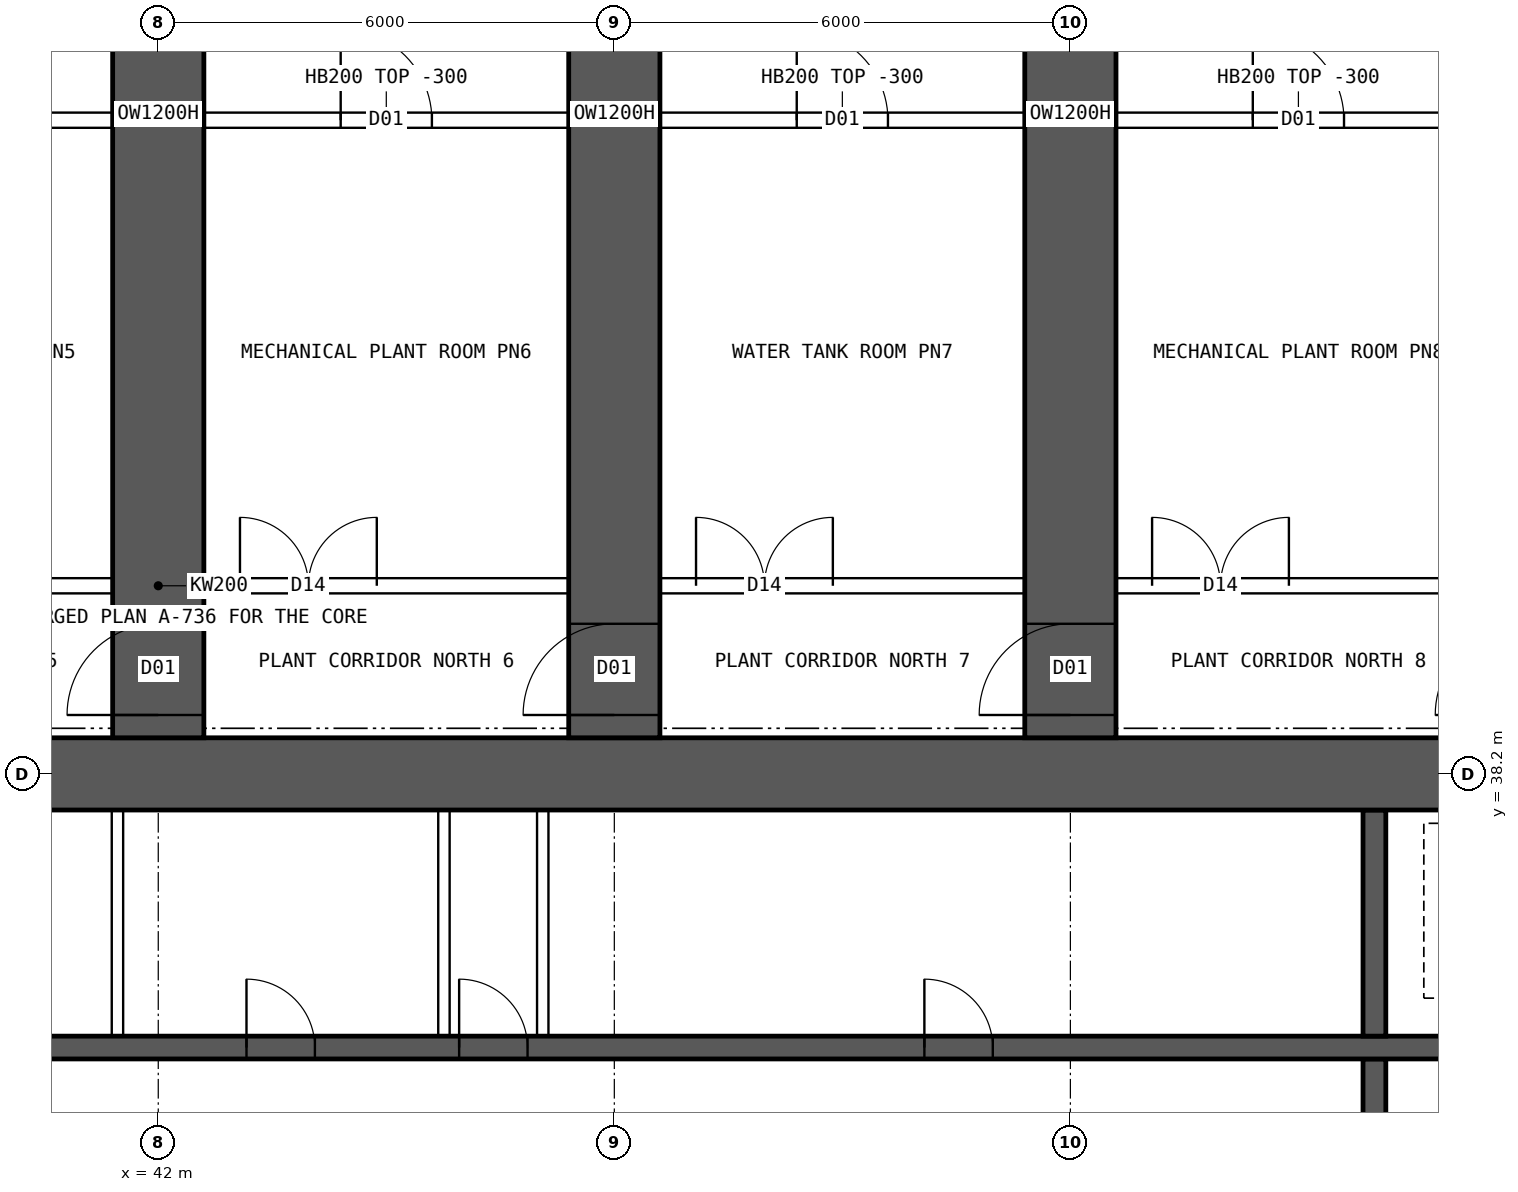
"""IFC4 building model, lengths in metres.
Left out: names, types, materials, properties, quantities, classifications, styles, units other than length and angle.
Written with IfcOpenShell. Run it as: python <this file> out.ifc"""

import sys

from ifc_helpers import new_model, si_unit, direction, frame, frame_2d, origin, place, context, subcontext, project, spatial, rectangle, extrude, element, fill, save


model = new_model("IFC4")
c1 = context("Model", 3, precision=1e-05, world=origin(), true_north=direction((0.0, 1.0)))
c2 = subcontext(c1, "Body", "Model", "MODEL_VIEW")
j1 = project(units=[si_unit("LENGTHUNIT", "METRE"), si_unit("PLANEANGLEUNIT", "RADIAN")], contexts=[c1])
p1 = place(None, origin())
s1 = spatial("IfcSite", under=j1, at=p1, CompositionType="ELEMENT")
p2 = place(p1, origin())
s2 = spatial("IfcBuilding", under=s1, at=p2, CompositionType="ELEMENT")
p3 = place(p2, frame((0.0, 0.0, 133.15)))
s3 = spatial("IfcBuildingStorey", under=s2, at=p3, CompositionType="ELEMENT", Elevation=133.15)
p4 = place(p3, frame((18.0, 38.2, 0.0), z_axis=(0.0, 0.0, 1.0), x_axis=(1.0, 0.0, 0.0)))
e1 = element("IfcWall", 1, at=p4, inside=s3, PredefinedType="SHEAR", context=c2, shape_type="SweptSolid", body=[
    extrude(rectangle(XDim=48.0, YDim=0.95, at=frame_2d((24.0, 0.0))), origin(), (0.0, 0.0, 1.0), 7.2),
])
p5 = place(p3, frame((18.475, 34.6, 0.0), z_axis=(0.0, 0.0, 1.0), x_axis=(1.0, 0.0, 0.0)))
e2 = element("IfcWall", 2, at=p5, inside=s3, PredefinedType="SHEAR", context=c2, shape_type="SweptSolid", body=[
    extrude(rectangle(XDim=47.05, YDim=0.3, at=frame_2d((23.525, 0.0))), origin(), (0.0, 0.0, 1.0), 7.2),
])
p6 = place(p5, frame((0.9, 0.0, 0.0)))
e3 = element("IfcOpeningElement", 3, at=p6, cuts=e2, PredefinedType="OPENING", context=c2, shape_type="SweptSolid", body=[
    extrude(rectangle(XDim=1.1, YDim=2.1, at=frame_2d((0.55, 1.05))), frame((0.0, 0.16, 0.0), z_axis=(0.0, -1.0, 0.0), x_axis=(1.0, 0.0, 0.0)), (0.0, 0.0, 1.0), 0.32),
])
p7 = place(p5, frame((45.05, 0.0, 0.0)))
e4 = element("IfcOpeningElement", 4, at=p7, cuts=e2, PredefinedType="OPENING", context=c2, shape_type="SweptSolid", body=[
    extrude(rectangle(XDim=1.1, YDim=2.1, at=frame_2d((0.55, 1.05))), frame((0.0, 0.16, 0.0), z_axis=(0.0, -1.0, 0.0), x_axis=(1.0, 0.0, 0.0)), (0.0, 0.0, 1.0), 0.32),
])
p8 = place(p5, frame((4.125, 0.0, 0.0)))
e5 = element("IfcOpeningElement", 5, at=p8, cuts=e2, PredefinedType="OPENING", context=c2, shape_type="SweptSolid", body=[
    extrude(rectangle(XDim=0.9, YDim=2.1, at=frame_2d((0.45, 1.05))), frame((0.0, 0.16, 0.0), z_axis=(0.0, -1.0, 0.0), x_axis=(1.0, 0.0, 0.0)), (0.0, 0.0, 1.0), 0.32),
])
p9 = place(p5, frame((42.025, 0.0, 0.0)))
e6 = element("IfcOpeningElement", 6, at=p9, cuts=e2, PredefinedType="OPENING", context=c2, shape_type="SweptSolid", body=[
    extrude(rectangle(XDim=0.9, YDim=2.1, at=frame_2d((0.45, 1.05))), frame((0.0, 0.16, 0.0), z_axis=(0.0, -1.0, 0.0), x_axis=(1.0, 0.0, 0.0)), (0.0, 0.0, 1.0), 0.32),
])
p10 = place(p5, frame((8.9, 0.0, 0.0)))
e7 = element("IfcOpeningElement", 7, at=p10, cuts=e2, PredefinedType="OPENING", context=c2, shape_type="SweptSolid", body=[
    extrude(rectangle(XDim=0.9, YDim=2.1, at=frame_2d((0.45, 1.05))), frame((0.0, 0.16, 0.0), z_axis=(0.0, -1.0, 0.0), x_axis=(1.0, 0.0, 0.0)), (0.0, 0.0, 1.0), 0.32),
])
p11 = place(p5, frame((12.874, 0.0, 0.0)))
e8 = element("IfcOpeningElement", 8, at=p11, cuts=e2, PredefinedType="OPENING", context=c2, shape_type="SweptSolid", body=[
    extrude(rectangle(XDim=0.9, YDim=2.1, at=frame_2d((0.45, 1.05))), frame((0.0, 0.16, 0.0), z_axis=(0.0, -1.0, 0.0), x_axis=(1.0, 0.0, 0.0)), (0.0, 0.0, 1.0), 0.32),
])
p12 = place(p5, frame((16.521, 0.0, 0.0)))
e9 = element("IfcOpeningElement", 9, at=p12, cuts=e2, PredefinedType="OPENING", context=c2, shape_type="SweptSolid", body=[
    extrude(rectangle(XDim=0.9, YDim=2.1, at=frame_2d((0.45, 1.05))), frame((0.0, 0.16, 0.0), z_axis=(0.0, -1.0, 0.0), x_axis=(1.0, 0.0, 0.0)), (0.0, 0.0, 1.0), 0.32),
])
p13 = place(p5, frame((20.28, 0.0, 0.0)))
e10 = element("IfcOpeningElement", 10, at=p13, cuts=e2, PredefinedType="OPENING", context=c2, shape_type="SweptSolid", body=[
    extrude(rectangle(XDim=0.9, YDim=2.1, at=frame_2d((0.45, 1.05))), frame((0.0, 0.16, 0.0), z_axis=(0.0, -1.0, 0.0), x_axis=(1.0, 0.0, 0.0)), (0.0, 0.0, 1.0), 0.32),
])
p14 = place(p5, frame((24.686, 0.0, 0.0)))
e11 = element("IfcOpeningElement", 11, at=p14, cuts=e2, PredefinedType="OPENING", context=c2, shape_type="SweptSolid", body=[
    extrude(rectangle(XDim=0.9, YDim=2.1, at=frame_2d((0.45, 1.05))), frame((0.0, 0.16, 0.0), z_axis=(0.0, -1.0, 0.0), x_axis=(1.0, 0.0, 0.0)), (0.0, 0.0, 1.0), 0.32),
])
p15 = place(p5, frame((27.483, 0.0, 0.0)))
e12 = element("IfcOpeningElement", 12, at=p15, cuts=e2, PredefinedType="OPENING", context=c2, shape_type="SweptSolid", body=[
    extrude(rectangle(XDim=0.9, YDim=2.1, at=frame_2d((0.45, 1.05))), frame((0.0, 0.16, 0.0), z_axis=(0.0, -1.0, 0.0), x_axis=(1.0, 0.0, 0.0)), (0.0, 0.0, 1.0), 0.32),
])
p16 = place(p5, frame((33.604, 0.0, 0.0)))
e13 = element("IfcOpeningElement", 13, at=p16, cuts=e2, PredefinedType="OPENING", context=c2, shape_type="SweptSolid", body=[
    extrude(rectangle(XDim=0.9, YDim=2.1, at=frame_2d((0.45, 1.05))), frame((0.0, 0.16, 0.0), z_axis=(0.0, -1.0, 0.0), x_axis=(1.0, 0.0, 0.0)), (0.0, 0.0, 1.0), 0.32),
])
p17 = place(p3, frame((58.0, 30.55, 0.0), z_axis=(0.0, 0.0, 1.0), x_axis=(0.0, 1.0, 0.0)))
e14 = element("IfcWall", 14, at=p17, inside=s3, PredefinedType="SHEAR", context=c2, shape_type="SweptSolid", body=[
    extrude(rectangle(XDim=3.9, YDim=0.3, at=frame_2d((1.95, 0.0))), origin(), (0.0, 0.0, 1.0), 7.2),
])
p18 = place(p17, frame((1.4, 0.0, 0.0)))
e15 = element("IfcOpeningElement", 15, at=p18, cuts=e14, PredefinedType="OPENING", context=c2, shape_type="SweptSolid", body=[
    extrude(rectangle(XDim=1.2, YDim=2.1, at=frame_2d((0.6, 1.05))), frame((0.0, 0.16, 0.0), z_axis=(0.0, -1.0, 0.0), x_axis=(1.0, 0.0, 0.0)), (0.0, 0.0, 1.0), 0.32),
])
p19 = place(p3, frame((58.0, 34.75, 0.0), z_axis=(0.0, 0.0, 1.0), x_axis=(0.0, 1.0, 0.0)))
e16 = element("IfcWall", 16, at=p19, inside=s3, PredefinedType="SHEAR", context=c2, shape_type="SweptSolid", body=[
    extrude(rectangle(XDim=2.975, YDim=0.3, at=frame_2d((1.488, 0.0))), origin(), (0.0, 0.0, 1.0), 7.2),
])
p20 = place(p3, frame((42.0, 38.675, 0.0), z_axis=(0.0, 0.0, 1.0), x_axis=(0.0, 1.0, 0.0)))
e17 = element("IfcWall", 17, at=p20, inside=s3, PredefinedType="SHEAR", context=c2, shape_type="SweptSolid", body=[
    extrude(rectangle(XDim=16.425, YDim=1.2, at=frame_2d((8.212, 0.0))), origin(), (0.0, 0.0, 1.0), 7.2),
])
p21 = place(p20, frame((0.3, 0.0, 0.0)))
e18 = element("IfcOpeningElement", 18, at=p21, cuts=e17, PredefinedType="OPENING", context=c2, shape_type="SweptSolid", body=[
    extrude(rectangle(XDim=1.2, YDim=2.1, at=frame_2d((0.6, 1.05))), frame((0.0, 0.61, 0.0), z_axis=(0.0, -1.0, 0.0), x_axis=(1.0, 0.0, 0.0)), (0.0, 0.0, 1.0), 1.22),
])
p22 = place(p3, frame((48.0, 38.675, 0.0), z_axis=(0.0, 0.0, 1.0), x_axis=(0.0, 1.0, 0.0)))
e19 = element("IfcWall", 19, at=p22, inside=s3, PredefinedType="SHEAR", context=c2, shape_type="SweptSolid", body=[
    extrude(rectangle(XDim=16.425, YDim=1.2, at=frame_2d((8.212, 0.0))), origin(), (0.0, 0.0, 1.0), 7.2),
])
p23 = place(p22, frame((0.3, 0.0, 0.0)))
e20 = element("IfcOpeningElement", 20, at=p23, cuts=e19, PredefinedType="OPENING", context=c2, shape_type="SweptSolid", body=[
    extrude(rectangle(XDim=1.2, YDim=2.1, at=frame_2d((0.6, 1.05))), frame((0.0, 0.61, 0.0), z_axis=(0.0, -1.0, 0.0), x_axis=(1.0, 0.0, 0.0)), (0.0, 0.0, 1.0), 1.22),
])
p24 = place(p3, frame((54.0, 38.675, 0.0), z_axis=(0.0, 0.0, 1.0), x_axis=(0.0, 1.0, 0.0)))
e21 = element("IfcWall", 21, at=p24, inside=s3, PredefinedType="SHEAR", context=c2, shape_type="SweptSolid", body=[
    extrude(rectangle(XDim=16.425, YDim=1.2, at=frame_2d((8.212, 0.0))), origin(), (0.0, 0.0, 1.0), 7.2),
])
p25 = place(p24, frame((0.3, 0.0, 0.0)))
e22 = element("IfcOpeningElement", 22, at=p25, cuts=e21, PredefinedType="OPENING", context=c2, shape_type="SweptSolid", body=[
    extrude(rectangle(XDim=1.2, YDim=2.1, at=frame_2d((0.6, 1.05))), frame((0.0, 0.61, 0.0), z_axis=(0.0, -1.0, 0.0), x_axis=(1.0, 0.0, 0.0)), (0.0, 0.0, 1.0), 1.22),
])
for number, where, z_axis, x_axis in (
    (23, (41.463, 34.75, 0.0), (0.0, 0.0, 1.0), (0.0, 1.0, 0.0)),
    (24, (45.758, 34.75, 0.0), (0.0, 0.0, 1.0), (0.0, 1.0, 0.0)),
    (25, (47.058, 34.75, 0.0), (0.0, 0.0, 1.0), (0.0, 1.0, 0.0)),
):
    element("IfcWall", number, at=place(p3, frame(where, z_axis=z_axis, x_axis=x_axis)), inside=s3, PredefinedType="SOLIDWALL", context=c2, shape_type="SweptSolid", body=[
        extrude(rectangle(XDim=2.975, YDim=0.15, at=frame_2d((1.488, 0.0))), origin(), (0.0, 0.0, 1.0), 6.9),
    ])
p26 = place(p3, frame((15.6, 40.675, 0.0), z_axis=(0.0, 0.0, 1.0), x_axis=(1.0, 0.0, 0.0)))
e26 = element("IfcWall", 26, at=p26, inside=s3, PredefinedType="SOLIDWALL", context=c2, shape_type="SweptSolid", body=[
    extrude(rectangle(XDim=52.8, YDim=0.2, at=frame_2d((26.4, 0.0))), origin(), (0.0, 0.0, 1.0), 6.9),
])
p27 = place(p26, frame((0.6, 0.0, 0.0)))
e27 = element("IfcOpeningElement", 27, at=p27, cuts=e26, PredefinedType="OPENING", context=c2, shape_type="SweptSolid", body=[
    extrude(rectangle(XDim=1.2, YDim=2.1, at=frame_2d((0.6, 1.05))), frame((0.0, 0.11, 0.0), z_axis=(0.0, -1.0, 0.0), x_axis=(1.0, 0.0, 0.0)), (0.0, 0.0, 1.0), 0.22),
])
p28 = place(p26, frame((3.475, 0.0, 0.0)))
e28 = element("IfcOpeningElement", 28, at=p28, cuts=e26, PredefinedType="OPENING", context=c2, shape_type="SweptSolid", body=[
    extrude(rectangle(XDim=1.8, YDim=2.4, at=frame_2d((0.9, 1.2))), frame((0.0, 0.11, 0.0), z_axis=(0.0, -1.0, 0.0), x_axis=(1.0, 0.0, 0.0)), (0.0, 0.0, 1.0), 0.22),
])
p29 = place(p26, frame((9.475, 0.0, 0.0)))
e29 = element("IfcOpeningElement", 29, at=p29, cuts=e26, PredefinedType="OPENING", context=c2, shape_type="SweptSolid", body=[
    extrude(rectangle(XDim=1.8, YDim=2.4, at=frame_2d((0.9, 1.2))), frame((0.0, 0.11, 0.0), z_axis=(0.0, -1.0, 0.0), x_axis=(1.0, 0.0, 0.0)), (0.0, 0.0, 1.0), 0.22),
])
p30 = place(p26, frame((15.475, 0.0, 0.0)))
e30 = element("IfcOpeningElement", 30, at=p30, cuts=e26, PredefinedType="OPENING", context=c2, shape_type="SweptSolid", body=[
    extrude(rectangle(XDim=1.8, YDim=2.4, at=frame_2d((0.9, 1.2))), frame((0.0, 0.11, 0.0), z_axis=(0.0, -1.0, 0.0), x_axis=(1.0, 0.0, 0.0)), (0.0, 0.0, 1.0), 0.22),
])
p31 = place(p26, frame((21.475, 0.0, 0.0)))
e31 = element("IfcOpeningElement", 31, at=p31, cuts=e26, PredefinedType="OPENING", context=c2, shape_type="SweptSolid", body=[
    extrude(rectangle(XDim=1.8, YDim=2.4, at=frame_2d((0.9, 1.2))), frame((0.0, 0.11, 0.0), z_axis=(0.0, -1.0, 0.0), x_axis=(1.0, 0.0, 0.0)), (0.0, 0.0, 1.0), 0.22),
])
p32 = place(p26, frame((27.475, 0.0, 0.0)))
e32 = element("IfcOpeningElement", 32, at=p32, cuts=e26, PredefinedType="OPENING", context=c2, shape_type="SweptSolid", body=[
    extrude(rectangle(XDim=1.8, YDim=2.4, at=frame_2d((0.9, 1.2))), frame((0.0, 0.11, 0.0), z_axis=(0.0, -1.0, 0.0), x_axis=(1.0, 0.0, 0.0)), (0.0, 0.0, 1.0), 0.22),
])
p33 = place(p26, frame((33.475, 0.0, 0.0)))
e33 = element("IfcOpeningElement", 33, at=p33, cuts=e26, PredefinedType="OPENING", context=c2, shape_type="SweptSolid", body=[
    extrude(rectangle(XDim=1.8, YDim=2.4, at=frame_2d((0.9, 1.2))), frame((0.0, 0.11, 0.0), z_axis=(0.0, -1.0, 0.0), x_axis=(1.0, 0.0, 0.0)), (0.0, 0.0, 1.0), 0.22),
])
p34 = place(p26, frame((39.475, 0.0, 0.0)))
e34 = element("IfcOpeningElement", 34, at=p34, cuts=e26, PredefinedType="OPENING", context=c2, shape_type="SweptSolid", body=[
    extrude(rectangle(XDim=1.8, YDim=2.4, at=frame_2d((0.9, 1.2))), frame((0.0, 0.11, 0.0), z_axis=(0.0, -1.0, 0.0), x_axis=(1.0, 0.0, 0.0)), (0.0, 0.0, 1.0), 0.22),
])
p35 = place(p26, frame((45.475, 0.0, 0.0)))
e35 = element("IfcOpeningElement", 35, at=p35, cuts=e26, PredefinedType="OPENING", context=c2, shape_type="SweptSolid", body=[
    extrude(rectangle(XDim=1.8, YDim=2.4, at=frame_2d((0.9, 1.2))), frame((0.0, 0.11, 0.0), z_axis=(0.0, -1.0, 0.0), x_axis=(1.0, 0.0, 0.0)), (0.0, 0.0, 1.0), 0.22),
])
p36 = place(p26, frame((51.475, 0.0, 0.0)))
e36 = element("IfcOpeningElement", 36, at=p36, cuts=e26, PredefinedType="OPENING", context=c2, shape_type="SweptSolid", body=[
    extrude(rectangle(XDim=1.2, YDim=2.1, at=frame_2d((0.6, 1.05))), frame((0.0, 0.11, 0.0), z_axis=(0.0, -1.0, 0.0), x_axis=(1.0, 0.0, 0.0)), (0.0, 0.0, 1.0), 0.22),
])
p37 = place(p3, frame((36.475, 46.8, 0.0), z_axis=(0.0, 0.0, 1.0), x_axis=(1.0, 0.0, 0.0)))
e37 = element("IfcWall", 37, at=p37, inside=s3, PredefinedType="SOLIDWALL", context=c2, shape_type="SweptSolid", body=[
    extrude(rectangle(XDim=5.05, YDim=0.2, at=frame_2d((2.525, 0.0))), origin(), (0.0, 0.0, 1.0), 6.9),
])
p38 = place(p37, frame((1.925, 0.0, 0.0)))
e38 = element("IfcOpeningElement", 38, at=p38, cuts=e37, PredefinedType="OPENING", context=c2, shape_type="SweptSolid", body=[
    extrude(rectangle(XDim=1.2, YDim=2.1, at=frame_2d((0.6, 1.05))), frame((0.0, 0.11, 0.0), z_axis=(0.0, -1.0, 0.0), x_axis=(1.0, 0.0, 0.0)), (0.0, 0.0, 1.0), 0.22),
])
p39 = place(p3, frame((42.475, 46.8, 0.0), z_axis=(0.0, 0.0, 1.0), x_axis=(1.0, 0.0, 0.0)))
e39 = element("IfcWall", 39, at=p39, inside=s3, PredefinedType="SOLIDWALL", context=c2, shape_type="SweptSolid", body=[
    extrude(rectangle(XDim=5.05, YDim=0.2, at=frame_2d((2.525, 0.0))), origin(), (0.0, 0.0, 1.0), 6.9),
])
p40 = place(p39, frame((1.925, 0.0, 0.0)))
e40 = element("IfcOpeningElement", 40, at=p40, cuts=e39, PredefinedType="OPENING", context=c2, shape_type="SweptSolid", body=[
    extrude(rectangle(XDim=1.2, YDim=2.1, at=frame_2d((0.6, 1.05))), frame((0.0, 0.11, 0.0), z_axis=(0.0, -1.0, 0.0), x_axis=(1.0, 0.0, 0.0)), (0.0, 0.0, 1.0), 0.22),
])
p41 = place(p3, frame((48.475, 46.8, 0.0), z_axis=(0.0, 0.0, 1.0), x_axis=(1.0, 0.0, 0.0)))
e41 = element("IfcWall", 41, at=p41, inside=s3, PredefinedType="SOLIDWALL", context=c2, shape_type="SweptSolid", body=[
    extrude(rectangle(XDim=5.05, YDim=0.2, at=frame_2d((2.525, 0.0))), origin(), (0.0, 0.0, 1.0), 6.9),
])
p42 = place(p41, frame((1.925, 0.0, 0.0)))
e42 = element("IfcOpeningElement", 42, at=p42, cuts=e41, PredefinedType="OPENING", context=c2, shape_type="SweptSolid", body=[
    extrude(rectangle(XDim=1.2, YDim=2.1, at=frame_2d((0.6, 1.05))), frame((0.0, 0.11, 0.0), z_axis=(0.0, -1.0, 0.0), x_axis=(1.0, 0.0, 0.0)), (0.0, 0.0, 1.0), 0.22),
])
p43 = place(p3, frame((54.475, 46.8, 0.0), z_axis=(0.0, 0.0, 1.0), x_axis=(1.0, 0.0, 0.0)))
e43 = element("IfcWall", 43, at=p43, inside=s3, PredefinedType="SOLIDWALL", context=c2, shape_type="SweptSolid", body=[
    extrude(rectangle(XDim=5.05, YDim=0.2, at=frame_2d((2.525, 0.0))), origin(), (0.0, 0.0, 1.0), 6.9),
])
p44 = place(p43, frame((1.925, 0.0, 0.0)))
e44 = element("IfcOpeningElement", 44, at=p44, cuts=e43, PredefinedType="OPENING", context=c2, shape_type="SweptSolid", body=[
    extrude(rectangle(XDim=1.2, YDim=2.1, at=frame_2d((0.6, 1.05))), frame((0.0, 0.11, 0.0), z_axis=(0.0, -1.0, 0.0), x_axis=(1.0, 0.0, 0.0)), (0.0, 0.0, 1.0), 0.22),
])
p45 = place(p14, origin())
e45 = element("IfcDoor", 45, at=p45, inside=s3, OperationType="SINGLE_SWING_LEFT", PredefinedType="DOOR", context=c2, shape_type="SweptSolid", body=[
    extrude(rectangle(XDim=0.9, YDim=2.1, at=frame_2d((0.45, 1.05))), frame((0.0, 0.025, 0.0), z_axis=(0.0, -1.0, 0.0), x_axis=(1.0, 0.0, 0.0)), (0.0, 0.0, 1.0), 0.05),
])
fill(e11, e45)
p46 = place(p15, origin())
e46 = element("IfcDoor", 46, at=p46, inside=s3, OperationType="SINGLE_SWING_LEFT", PredefinedType="DOOR", context=c2, shape_type="SweptSolid", body=[
    extrude(rectangle(XDim=0.9, YDim=2.1, at=frame_2d((0.45, 1.05))), frame((0.0, 0.025, 0.0), z_axis=(0.0, -1.0, 0.0), x_axis=(1.0, 0.0, 0.0)), (0.0, 0.0, 1.0), 0.05),
])
fill(e12, e46)
p47 = place(p16, origin())
e47 = element("IfcDoor", 47, at=p47, inside=s3, OperationType="SINGLE_SWING_LEFT", PredefinedType="DOOR", context=c2, shape_type="SweptSolid", body=[
    extrude(rectangle(XDim=0.9, YDim=2.1, at=frame_2d((0.45, 1.05))), frame((0.0, 0.025, 0.0), z_axis=(0.0, -1.0, 0.0), x_axis=(1.0, 0.0, 0.0)), (0.0, 0.0, 1.0), 0.05),
])
fill(e13, e47)
p48 = place(p40, origin())
e48 = element("IfcDoor", 48, at=p48, inside=s3, OperationType="SINGLE_SWING_LEFT", PredefinedType="DOOR", context=c2, shape_type="SweptSolid", body=[
    extrude(rectangle(XDim=1.2, YDim=2.1, at=frame_2d((0.6, 1.05))), frame((0.0, 0.025, 0.0), z_axis=(0.0, -1.0, 0.0), x_axis=(1.0, 0.0, 0.0)), (0.0, 0.0, 1.0), 0.05),
])
fill(e40, e48)
p49 = place(p42, origin())
e49 = element("IfcDoor", 49, at=p49, inside=s3, OperationType="SINGLE_SWING_LEFT", PredefinedType="DOOR", context=c2, shape_type="SweptSolid", body=[
    extrude(rectangle(XDim=1.2, YDim=2.1, at=frame_2d((0.6, 1.05))), frame((0.0, 0.025, 0.0), z_axis=(0.0, -1.0, 0.0), x_axis=(1.0, 0.0, 0.0)), (0.0, 0.0, 1.0), 0.05),
])
fill(e42, e49)
p50 = place(p44, origin())
e50 = element("IfcDoor", 50, at=p50, inside=s3, OperationType="SINGLE_SWING_LEFT", PredefinedType="DOOR", context=c2, shape_type="SweptSolid", body=[
    extrude(rectangle(XDim=1.2, YDim=2.1, at=frame_2d((0.6, 1.05))), frame((0.0, 0.025, 0.0), z_axis=(0.0, -1.0, 0.0), x_axis=(1.0, 0.0, 0.0)), (0.0, 0.0, 1.0), 0.05),
])
fill(e44, e50)
p51 = place(p32, origin())
e51 = element("IfcDoor", 51, at=p51, inside=s3, OperationType="DOUBLE_DOOR_SINGLE_SWING", PredefinedType="DOOR", context=c2, shape_type="SweptSolid", body=[
    extrude(rectangle(XDim=1.8, YDim=2.4, at=frame_2d((0.9, 1.2))), frame((0.0, 0.025, 0.0), z_axis=(0.0, -1.0, 0.0), x_axis=(1.0, 0.0, 0.0)), (0.0, 0.0, 1.0), 0.05),
])
fill(e32, e51)
p52 = place(p33, origin())
e52 = element("IfcDoor", 52, at=p52, inside=s3, OperationType="DOUBLE_DOOR_SINGLE_SWING", PredefinedType="DOOR", context=c2, shape_type="SweptSolid", body=[
    extrude(rectangle(XDim=1.8, YDim=2.4, at=frame_2d((0.9, 1.2))), frame((0.0, 0.025, 0.0), z_axis=(0.0, -1.0, 0.0), x_axis=(1.0, 0.0, 0.0)), (0.0, 0.0, 1.0), 0.05),
])
fill(e33, e52)
p53 = place(p34, origin())
e53 = element("IfcDoor", 53, at=p53, inside=s3, OperationType="DOUBLE_DOOR_SINGLE_SWING", PredefinedType="DOOR", context=c2, shape_type="SweptSolid", body=[
    extrude(rectangle(XDim=1.8, YDim=2.4, at=frame_2d((0.9, 1.2))), frame((0.0, 0.025, 0.0), z_axis=(0.0, -1.0, 0.0), x_axis=(1.0, 0.0, 0.0)), (0.0, 0.0, 1.0), 0.05),
])
fill(e34, e53)
p54 = place(p21, origin())
e54 = element("IfcDoor", 54, at=p54, inside=s3, OperationType="SINGLE_SWING_LEFT", PredefinedType="DOOR", context=c2, shape_type="SweptSolid", body=[
    extrude(rectangle(XDim=1.2, YDim=2.1, at=frame_2d((0.6, 1.05))), frame((0.0, 0.025, 0.0), z_axis=(0.0, -1.0, 0.0), x_axis=(1.0, 0.0, 0.0)), (0.0, 0.0, 1.0), 0.05),
])
fill(e18, e54)
p55 = place(p23, origin())
e55 = element("IfcDoor", 55, at=p55, inside=s3, OperationType="SINGLE_SWING_LEFT", PredefinedType="DOOR", context=c2, shape_type="SweptSolid", body=[
    extrude(rectangle(XDim=1.2, YDim=2.1, at=frame_2d((0.6, 1.05))), frame((0.0, 0.025, 0.0), z_axis=(0.0, -1.0, 0.0), x_axis=(1.0, 0.0, 0.0)), (0.0, 0.0, 1.0), 0.05),
])
fill(e20, e55)
p56 = place(p25, origin())
e56 = element("IfcDoor", 56, at=p56, inside=s3, OperationType="SINGLE_SWING_LEFT", PredefinedType="DOOR", context=c2, shape_type="SweptSolid", body=[
    extrude(rectangle(XDim=1.2, YDim=2.1, at=frame_2d((0.6, 1.05))), frame((0.0, 0.025, 0.0), z_axis=(0.0, -1.0, 0.0), x_axis=(1.0, 0.0, 0.0)), (0.0, 0.0, 1.0), 0.05),
])
fill(e22, e56)
save(model, sys.argv[1])
